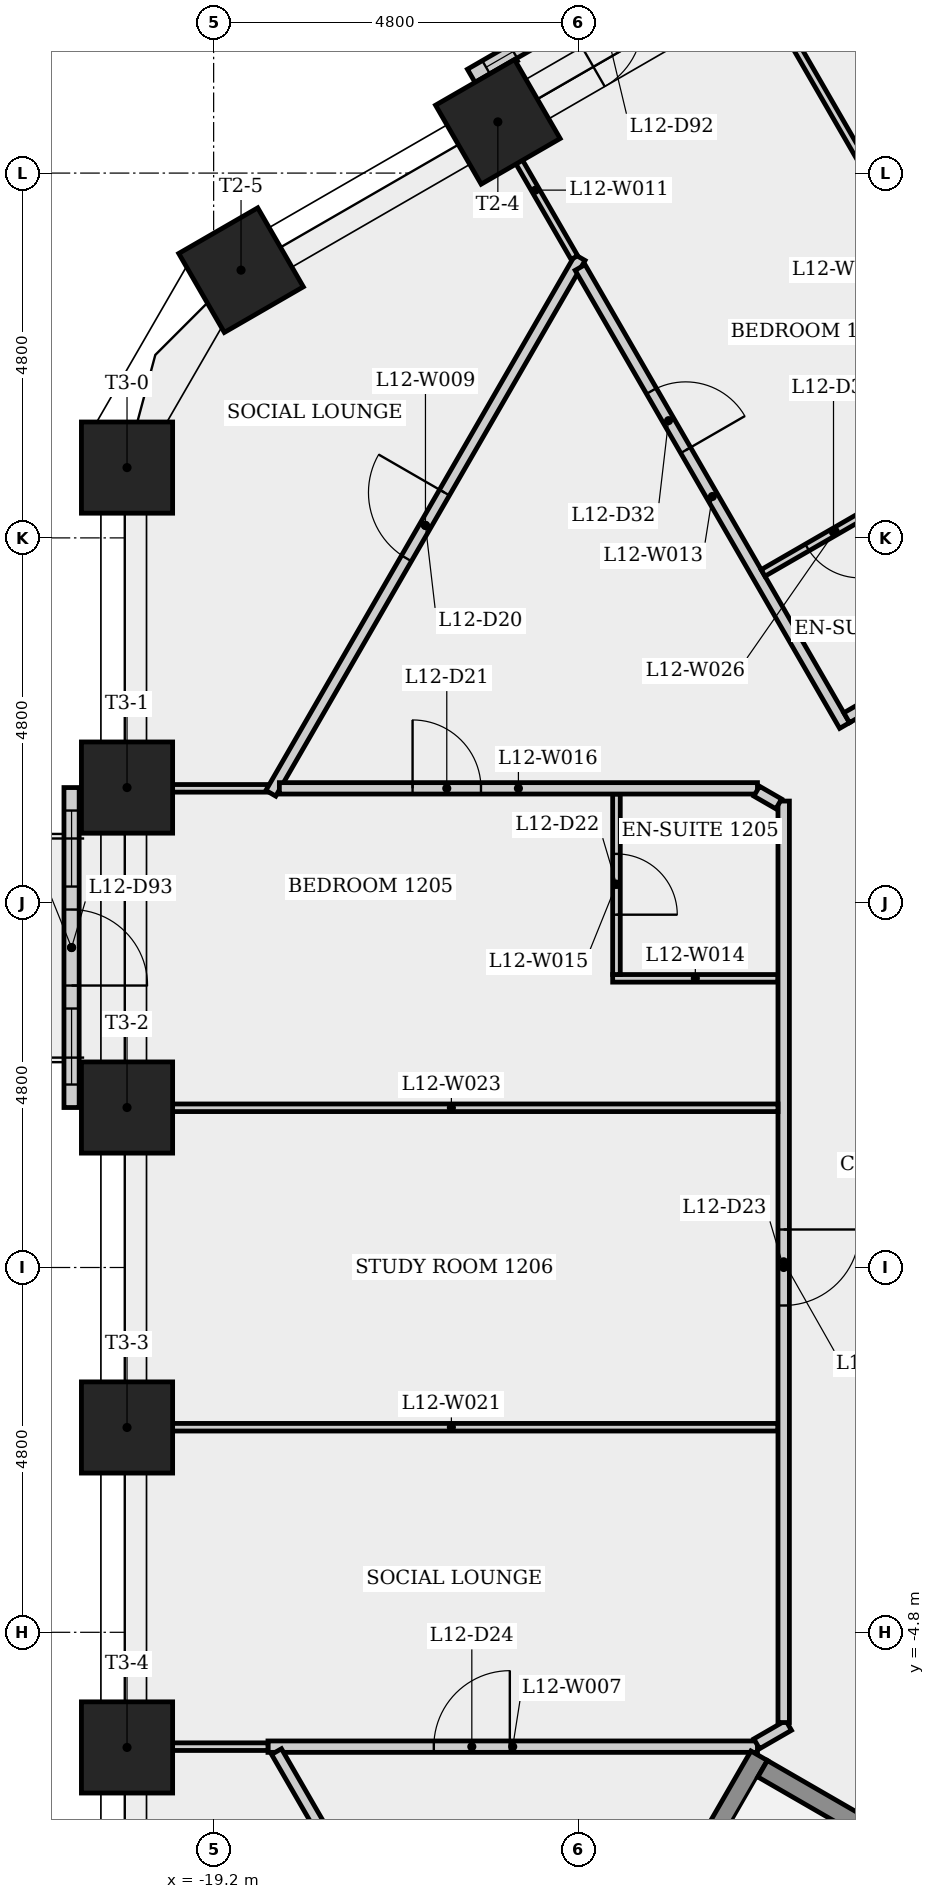
"""IFC4 building model, lengths in metres.
Left out: names, types, materials, properties, quantities, classifications, styles, units other than length and angle.
Written with IfcOpenShell. Run it as: python <this file> out.ifc"""

import sys

from ifc_helpers import new_model, si_unit, direction, frame, frame_2d, origin, origin_2d, place, context, subcontext, project, spatial, rectangle, extrude, element, fill, save


model = new_model("IFC4")
c1 = context("Model", 3, precision=1e-05, world=origin(), true_north=direction((0.0, 1.0)))
c2 = subcontext(c1, "Body", "Model", "MODEL_VIEW")
j1 = project(units=[si_unit("LENGTHUNIT", "METRE"), si_unit("PLANEANGLEUNIT", "RADIAN")], contexts=[c1])
p1 = place(None, origin())
s1 = spatial("IfcSite", under=j1, at=p1, CompositionType="ELEMENT")
p2 = place(p1, origin())
s2 = spatial("IfcBuilding", under=s1, at=p2, CompositionType="ELEMENT")
p3 = place(p2, frame((0.0, 0.0, 49.3)))
s3 = spatial("IfcBuildingStorey", under=s2, at=p3, CompositionType="ELEMENT", Elevation=49.3)
for number, where, z_axis, x_axis in (
    (1, (-15.461, 15.074, 0.0), (0.0, 0.0, 1.0), (-0.5, 0.866, 0.0)),
    (2, (-18.84, 13.123, 0.0), (0.0, 0.0, 1.0), (-0.5, 0.866, 0.0)),
    (3, (-20.34, 10.525, 0.0), (0.0, 0.0, 1.0), (-1.0, 0.0, 0.0)),
    (4, (-20.34, 6.315, 0.0), (0.0, 0.0, 1.0), (-1.0, 0.0, 0.0)),
    (5, (-20.34, 2.105, 0.0), (0.0, 0.0, 1.0), (-1.0, 0.0, 0.0)),
    (6, (-20.34, -2.105, 0.0), (0.0, 0.0, 1.0), (-1.0, 0.0, 0.0)),
    (7, (-20.34, -6.315, 0.0), (0.0, 0.0, 1.0), (-1.0, 0.0, 0.0)),
):
    element("IfcColumn", number, at=place(p3, frame(where, z_axis=z_axis, x_axis=x_axis)), inside=s3, PredefinedType="COLUMN", context=c2, shape_type="SweptSolid", body=[
        extrude(rectangle(XDim=1.2, YDim=1.2, at=origin_2d()), origin(), (0.0, 0.0, 1.0), 3.4),
    ])
p4 = place(p3, frame((-12.432, 17.631, 0.0), z_axis=(0.0, 0.0, 1.0), x_axis=(-0.866028250644, -0.499995069063, 0.0)))
e8 = element("IfcWall", 8, at=p4, inside=s3, PredefinedType="SOLIDWALL", context=c2, shape_type="SweptSolid", body=[
    extrude(rectangle(XDim=3.902, YDim=0.2, at=frame_2d((1.951, 0.0))), origin(), (0.0, 0.0, 1.0), 3.4),
])
p5 = place(p4, frame((1.451, 0.0, 0.0)))
e9 = element("IfcOpeningElement", 9, at=p5, cuts=e8, PredefinedType="OPENING", context=c2, shape_type="SweptSolid", body=[
    extrude(rectangle(XDim=1.0, YDim=2.4, at=frame_2d((0.5, 1.2))), frame((0.0, 0.11, 0.0), z_axis=(0.0, -1.0, 0.0), x_axis=(1.0, 0.0, 0.0)), (0.0, 0.0, 1.0), 0.22),
])
p6 = place(p4, frame((0.226, 0.0, 0.9)))
e10 = element("IfcOpeningElement", 10, at=p6, cuts=e8, PredefinedType="OPENING", context=c2, shape_type="SweptSolid", body=[
    extrude(rectangle(XDim=1.0, YDim=1.5, at=frame_2d((0.5, 0.75))), frame((0.0, 0.11, 0.0), z_axis=(0.0, -1.0, 0.0), x_axis=(1.0, 0.0, 0.0)), (0.0, 0.0, 1.0), 0.22),
])
p7 = place(p4, frame((2.677, 0.0, 0.9)))
e11 = element("IfcOpeningElement", 11, at=p7, cuts=e8, PredefinedType="OPENING", context=c2, shape_type="SweptSolid", body=[
    extrude(rectangle(XDim=1.0, YDim=1.5, at=frame_2d((0.5, 0.75))), frame((0.0, 0.11, 0.0), z_axis=(0.0, -1.0, 0.0), x_axis=(1.0, 0.0, 0.0)), (0.0, 0.0, 1.0), 0.22),
])
p8 = place(p3, frame((-21.069, 6.315, 0.0), z_axis=(0.0, 0.0, 1.0), x_axis=(0.0, -1.0, 0.0)))
e12 = element("IfcWall", 12, at=p8, inside=s3, PredefinedType="SOLIDWALL", context=c2, shape_type="SweptSolid", body=[
    extrude(rectangle(XDim=4.21, YDim=0.2, at=frame_2d((2.105, 0.0))), origin(), (0.0, 0.0, 1.0), 3.4),
])
p9 = place(p8, frame((1.605, 0.0, 0.0)))
e13 = element("IfcOpeningElement", 13, at=p9, cuts=e12, PredefinedType="OPENING", context=c2, shape_type="SweptSolid", body=[
    extrude(rectangle(XDim=1.0, YDim=2.4, at=frame_2d((0.5, 1.2))), frame((0.0, 0.11, 0.0), z_axis=(0.0, -1.0, 0.0), x_axis=(1.0, 0.0, 0.0)), (0.0, 0.0, 1.0), 0.22),
])
p10 = place(p8, frame((0.302, 0.0, 0.9)))
e14 = element("IfcOpeningElement", 14, at=p10, cuts=e12, PredefinedType="OPENING", context=c2, shape_type="SweptSolid", body=[
    extrude(rectangle(XDim=1.0, YDim=1.5, at=frame_2d((0.5, 0.75))), frame((0.0, 0.11, 0.0), z_axis=(0.0, -1.0, 0.0), x_axis=(1.0, 0.0, 0.0)), (0.0, 0.0, 1.0), 0.22),
])
p11 = place(p8, frame((2.907, 0.0, 0.9)))
e15 = element("IfcOpeningElement", 15, at=p11, cuts=e12, PredefinedType="OPENING", context=c2, shape_type="SweptSolid", body=[
    extrude(rectangle(XDim=1.0, YDim=1.5, at=frame_2d((0.5, 0.75))), frame((0.0, 0.11, 0.0), z_axis=(0.0, -1.0, 0.0), x_axis=(1.0, 0.0, 0.0)), (0.0, 0.0, 1.0), 0.22),
])
p12 = place(p3, frame((-18.485, -6.305, 0.0), z_axis=(0.0, 0.0, 1.0), x_axis=(1.0, 0.0, 0.0)))
e16 = element("IfcWall", 16, at=p12, inside=s3, PredefinedType="PARTITIONING", context=c2, shape_type="SweptSolid", body=[
    extrude(rectangle(XDim=6.44, YDim=0.15, at=frame_2d((3.22, 0.0))), origin(), (0.0, 0.0, 1.0), 3.05),
])
p13 = place(p12, frame((2.182, 0.0, 0.0)))
e17 = element("IfcOpeningElement", 17, at=p13, cuts=e16, PredefinedType="OPENING", context=c2, shape_type="SweptSolid", body=[
    extrude(rectangle(XDim=1.0, YDim=2.1, at=frame_2d((0.5, 1.05))), frame((0.0, 0.085, 0.0), z_axis=(0.0, -1.0, 0.0), x_axis=(1.0, 0.0, 0.0)), (0.0, 0.0, 1.0), 0.17),
])
p14 = place(p3, frame((-18.485, 6.305, 0.0), z_axis=(0.0, 0.0, 1.0), x_axis=(-1.0, 0.0, 0.0)))
e18 = element("IfcWall", 18, at=p14, inside=s3, PredefinedType="PARTITIONING", context=c2, shape_type="SweptSolid", body=[
    extrude(rectangle(XDim=1.884, YDim=0.1, at=frame_2d((0.942, 0.0))), origin(), (0.0, 0.0, 1.0), 3.05),
])
p15 = place(p3, frame((-18.448, 6.24, 0.0), z_axis=(0.0, 0.0, 1.0), x_axis=(0.499997699084, 0.866026732215, 0.0)))
e19 = element("IfcWall", 19, at=p15, inside=s3, PredefinedType="PARTITIONING", context=c2, shape_type="SweptSolid", body=[
    extrude(rectangle(XDim=8.139, YDim=0.15, at=frame_2d((4.069, 0.0))), origin(), (0.0, 0.0, 1.0), 3.05),
])
p16 = place(p15, frame((3.569, 0.0, 0.0)))
e20 = element("IfcOpeningElement", 20, at=p16, cuts=e19, PredefinedType="OPENING", context=c2, shape_type="SweptSolid", body=[
    extrude(rectangle(XDim=1.0, YDim=2.1, at=frame_2d((0.5, 1.05))), frame((0.0, 0.085, 0.0), z_axis=(0.0, -1.0, 0.0), x_axis=(1.0, 0.0, 0.0)), (0.0, 0.0, 1.0), 0.17),
])
p17 = place(p3, frame((-18.485, -6.305, 0.0), z_axis=(0.0, 0.0, 1.0), x_axis=(-1.0, 0.0, 0.0)))
e21 = element("IfcWall", 21, at=p17, inside=s3, PredefinedType="PARTITIONING", context=c2, shape_type="SweptSolid", body=[
    extrude(rectangle(XDim=1.884, YDim=0.1, at=frame_2d((0.942, 0.0))), origin(), (0.0, 0.0, 1.0), 3.05),
])
p18 = place(p3, frame((-15.479, 15.063, 0.0), z_axis=(0.0, 0.0, 1.0), x_axis=(0.500045446624, -0.865999163574, 0.0)))
e22 = element("IfcWall", 22, at=p18, inside=s3, PredefinedType="PARTITIONING", context=c2, shape_type="SweptSolid", body=[
    extrude(rectangle(XDim=2.05, YDim=0.1, at=frame_2d((1.025, 0.0))), origin(), (0.0, 0.0, 1.0), 3.05),
])
p19 = place(p3, frame((-15.145, -11.961, 0.0), z_axis=(0.0, 0.0, 1.0), x_axis=(-0.500014864668, 0.866016821494, 0.0)))
e23 = element("IfcWall", 23, at=p19, inside=s3, PredefinedType="PARTITIONING", context=c2, shape_type="SweptSolid", body=[
    extrude(rectangle(XDim=6.456, YDim=0.15, at=frame_2d((3.228, 0.0))), origin(), (0.0, 0.0, 1.0), 3.05),
])
p20 = place(p19, frame((2.766, 0.0, 0.0)))
e24 = element("IfcOpeningElement", 24, at=p20, cuts=e23, PredefinedType="OPENING", context=c2, shape_type="SweptSolid", body=[
    extrude(rectangle(XDim=1.0, YDim=2.1, at=frame_2d((0.5, 1.05))), frame((0.0, 0.085, 0.0), z_axis=(0.0, -1.0, 0.0), x_axis=(1.0, 0.0, 0.0)), (0.0, 0.0, 1.0), 0.17),
])
p21 = place(p3, frame((-14.378, 13.158, 0.0), z_axis=(0.0, 0.0, 1.0), x_axis=(0.499998787219, -0.866026103983, 0.0)))
e25 = element("IfcWall", 25, at=p21, inside=s3, PredefinedType="PARTITIONING", context=c2, shape_type="SweptSolid", body=[
    extrude(rectangle(XDim=6.959, YDim=0.15, at=frame_2d((3.48, 0.0))), origin(), (0.0, 0.0, 1.0), 3.05),
])
p22 = place(p21, frame((1.877, 0.0, 0.0)))
e26 = element("IfcOpeningElement", 26, at=p22, cuts=e25, PredefinedType="OPENING", context=c2, shape_type="SweptSolid", body=[
    extrude(rectangle(XDim=0.9, YDim=2.1, at=frame_2d((0.45, 1.05))), frame((0.0, 0.085, 0.0), z_axis=(0.0, -1.0, 0.0), x_axis=(1.0, 0.0, 0.0)), (0.0, 0.0, 1.0), 0.17),
])
p23 = place(p3, frame((-13.95, 3.805, 0.0), z_axis=(0.0, 0.0, 1.0), x_axis=(1.0, 0.0, 0.0)))
e27 = element("IfcWall", 27, at=p23, inside=s3, PredefinedType="PARTITIONING", context=c2, shape_type="SweptSolid", body=[
    extrude(rectangle(XDim=2.175, YDim=0.1, at=frame_2d((1.087, 0.0))), origin(), (0.0, 0.0, 1.0), 3.05),
])
p24 = place(p3, frame((-13.9, 6.23, 0.0), z_axis=(0.0, 0.0, 1.0), x_axis=(0.0, -1.0, 0.0)))
e28 = element("IfcWall", 28, at=p24, inside=s3, PredefinedType="PARTITIONING", context=c2, shape_type="SweptSolid", body=[
    extrude(rectangle(XDim=2.375, YDim=0.1, at=frame_2d((1.188, 0.0))), origin(), (0.0, 0.0, 1.0), 3.05),
])
p25 = place(p24, frame((0.788, 0.0, 0.0)))
e29 = element("IfcOpeningElement", 29, at=p25, cuts=e28, PredefinedType="OPENING", context=c2, shape_type="SweptSolid", body=[
    extrude(rectangle(XDim=0.8, YDim=2.1, at=frame_2d((0.4, 1.05))), frame((0.0, 0.06, 0.0), z_axis=(0.0, -1.0, 0.0), x_axis=(1.0, 0.0, 0.0)), (0.0, 0.0, 1.0), 0.12),
])
p26 = place(p3, frame((-18.335, 6.305, 0.0), z_axis=(0.0, 0.0, 1.0), x_axis=(1.0, 0.0, 0.0)))
e30 = element("IfcWall", 30, at=p26, inside=s3, PredefinedType="PARTITIONING", context=c2, shape_type="SweptSolid", body=[
    extrude(rectangle(XDim=6.29, YDim=0.15, at=frame_2d((3.145, 0.0))), origin(), (0.0, 0.0, 1.0), 3.05),
])
p27 = place(p26, frame((1.753, 0.0, 0.0)))
e31 = element("IfcOpeningElement", 31, at=p27, cuts=e30, PredefinedType="OPENING", context=c2, shape_type="SweptSolid", body=[
    extrude(rectangle(XDim=0.9, YDim=2.1, at=frame_2d((0.45, 1.05))), frame((0.0, 0.085, 0.0), z_axis=(0.0, -1.0, 0.0), x_axis=(1.0, 0.0, 0.0)), (0.0, 0.0, 1.0), 0.17),
])
p28 = place(p3, frame((-13.648, -9.239, 0.0), z_axis=(0.0, 0.0, 1.0), x_axis=(0.500017246033, 0.866015446554, 0.0)))
e32 = element("IfcWall", 32, at=p28, inside=s3, PredefinedType="SHEAR", context=c2, shape_type="SweptSolid", body=[
    extrude(rectangle(XDim=3.25, YDim=0.25, at=frame_2d((1.625, 0.0))), origin(), (0.0, 0.0, 1.0), 3.05),
])
p29 = place(p3, frame((-12.055, -6.267, 0.0), z_axis=(0.0, 0.0, 1.0), x_axis=(0.86616044843, 0.49976602283, 0.0)))
e33 = element("IfcWall", 33, at=p29, inside=s3, PredefinedType="PARTITIONING", context=c2, shape_type="SweptSolid", body=[
    extrude(rectangle(XDim=0.485, YDim=0.15, at=frame_2d((0.243, 0.0))), origin(), (0.0, 0.0, 1.0), 3.05),
])
p30 = place(p3, frame((-11.977, -6.595, 0.0), z_axis=(0.0, 0.0, 1.0), x_axis=(0.866025499775, -0.499999833739, 0.0)))
e34 = element("IfcWall", 34, at=p30, inside=s3, PredefinedType="SHEAR", context=c2, shape_type="SweptSolid", body=[
    extrude(rectangle(XDim=6.4, YDim=0.25, at=frame_2d((3.2, 0.0))), origin(), (0.0, 0.0, 1.0), 3.05),
])
p31 = place(p30, frame((5.025, 0.0, 0.0)))
e35 = element("IfcOpeningElement", 35, at=p31, cuts=e34, PredefinedType="OPENING", context=c2, shape_type="SweptSolid", body=[
    extrude(rectangle(XDim=1.0, YDim=2.1, at=frame_2d((0.5, 1.05))), frame((0.0, 0.135, 0.0), z_axis=(0.0, -1.0, 0.0), x_axis=(1.0, 0.0, 0.0)), (0.0, 0.0, 1.0), 0.27),
])
p32 = place(p3, frame((-11.775, -2.102, 0.0), z_axis=(0.0, 0.0, 1.0), x_axis=(-1.0, 0.0, 0.0)))
e36 = element("IfcWall", 36, at=p32, inside=s3, PredefinedType="PARTITIONING", context=c2, shape_type="SweptSolid", body=[
    extrude(rectangle(XDim=8.594, YDim=0.1, at=frame_2d((4.297, 0.0))), origin(), (0.0, 0.0, 1.0), 3.05),
])
p33 = place(p3, frame((-11.7, 6.137, 0.0), z_axis=(0.0, 0.0, 1.0), x_axis=(0.0, -1.0, 0.0)))
e37 = element("IfcWall", 37, at=p33, inside=s3, PredefinedType="PARTITIONING", context=c2, shape_type="SweptSolid", body=[
    extrude(rectangle(XDim=12.125, YDim=0.15, at=frame_2d((6.062, 0.0))), origin(), (0.0, 0.0, 1.0), 3.05),
])
p34 = place(p33, frame((5.637, 0.0, 0.0)))
e38 = element("IfcOpeningElement", 38, at=p34, cuts=e37, PredefinedType="OPENING", context=c2, shape_type="SweptSolid", body=[
    extrude(rectangle(XDim=1.0, YDim=2.1, at=frame_2d((0.5, 1.05))), frame((0.0, 0.085, 0.0), z_axis=(0.0, -1.0, 0.0), x_axis=(1.0, 0.0, 0.0)), (0.0, 0.0, 1.0), 0.17),
])
p35 = place(p3, frame((-11.775, 2.102, 0.0), z_axis=(0.0, 0.0, 1.0), x_axis=(-1.0, 0.0, 0.0)))
e39 = element("IfcWall", 39, at=p35, inside=s3, PredefinedType="PARTITIONING", context=c2, shape_type="SweptSolid", body=[
    extrude(rectangle(XDim=8.594, YDim=0.1, at=frame_2d((4.297, 0.0))), origin(), (0.0, 0.0, 1.0), 3.05),
])
p36 = place(p3, frame((-11.765, 6.1, 0.0), z_axis=(0.0, 0.0, 1.0), x_axis=(-0.866173457785, 0.499743475223, 0.0)))
e40 = element("IfcWall", 40, at=p36, inside=s3, PredefinedType="PARTITIONING", context=c2, shape_type="SweptSolid", body=[
    extrude(rectangle(XDim=0.335, YDim=0.15, at=frame_2d((0.167, 0.0))), origin(), (0.0, 0.0, 1.0), 3.05),
])
p37 = place(p3, frame((-10.871, 7.233, 0.0), z_axis=(0.0, 0.0, 1.0), x_axis=(0.866013843593, 0.500020022305, 0.0)))
e41 = element("IfcWall", 41, at=p37, inside=s3, PredefinedType="PARTITIONING", context=c2, shape_type="SweptSolid", body=[
    extrude(rectangle(XDim=11.671, YDim=0.15, at=frame_2d((5.835, 0.0))), origin(), (0.0, 0.0, 1.0), 3.05),
])
p38 = place(p37, frame((4.24, 0.0, 0.0)))
e42 = element("IfcOpeningElement", 42, at=p38, cuts=e41, PredefinedType="OPENING", context=c2, shape_type="SweptSolid", body=[
    extrude(rectangle(XDim=0.9, YDim=2.1, at=frame_2d((0.45, 1.05))), frame((0.0, 0.085, 0.0), z_axis=(0.0, -1.0, 0.0), x_axis=(1.0, 0.0, 0.0)), (0.0, 0.0, 1.0), 0.17),
])
p39 = place(p3, frame((-10.074, 10.234, 0.0), z_axis=(0.0, 0.0, 1.0), x_axis=(-0.866074224396, -0.499915430684, 0.0)))
e43 = element("IfcWall", 43, at=p39, inside=s3, PredefinedType="PARTITIONING", context=c2, shape_type="SweptSolid", body=[
    extrude(rectangle(XDim=2.19, YDim=0.1, at=frame_2d((1.095, 0.0))), origin(), (0.0, 0.0, 1.0), 3.05),
])
p40 = place(p39, frame((0.72, 0.0, 0.0)))
e44 = element("IfcOpeningElement", 44, at=p40, cuts=e43, PredefinedType="OPENING", context=c2, shape_type="SweptSolid", body=[
    extrude(rectangle(XDim=0.8, YDim=2.1, at=frame_2d((0.4, 1.05))), frame((0.0, 0.06, 0.0), z_axis=(0.0, -1.0, 0.0), x_axis=(1.0, 0.0, 0.0)), (0.0, 0.0, 1.0), 0.12),
])
p41 = place(p3, frame((-7.583, 9.219, 0.0), z_axis=(0.0, 0.0, 1.0), x_axis=(-0.499977347544, 0.866038481791, 0.0)))
e45 = element("IfcWall", 45, at=p41, inside=s3, PredefinedType="PARTITIONING", context=c2, shape_type="SweptSolid", body=[
    extrude(rectangle(XDim=9.01, YDim=0.1, at=frame_2d((4.505, 0.0))), origin(), (0.0, 0.0, 1.0), 3.05),
])
p42 = place(p7, origin())
e46 = element("IfcWindow", 46, at=p42, inside=s3, PartitioningType="SINGLE_PANEL", PredefinedType="WINDOW", context=c2, shape_type="SweptSolid", body=[
    extrude(rectangle(XDim=1.0, YDim=1.5, at=frame_2d((0.5, 0.75))), frame((0.0, 0.03, 0.0), z_axis=(0.0, -1.0, 0.0), x_axis=(1.0, 0.0, 0.0)), (0.0, 0.0, 1.0), 0.06),
])
fill(e11, e46)
p43 = place(p9, origin())
e47 = element("IfcDoor", 47, at=p43, inside=s3, OperationType="SINGLE_SWING_RIGHT", PredefinedType="DOOR", context=c2, shape_type="SweptSolid", body=[
    extrude(rectangle(XDim=1.0, YDim=2.4, at=frame_2d((0.5, 1.2))), frame((0.0, 0.025, 0.0), z_axis=(0.0, -1.0, 0.0), x_axis=(1.0, 0.0, 0.0)), (0.0, 0.0, 1.0), 0.05),
])
fill(e13, e47)
p44 = place(p10, origin())
e48 = element("IfcWindow", 48, at=p44, inside=s3, PartitioningType="SINGLE_PANEL", PredefinedType="WINDOW", context=c2, shape_type="SweptSolid", body=[
    extrude(rectangle(XDim=1.0, YDim=1.5, at=frame_2d((0.5, 0.75))), frame((0.0, 0.03, 0.0), z_axis=(0.0, -1.0, 0.0), x_axis=(1.0, 0.0, 0.0)), (0.0, 0.0, 1.0), 0.06),
])
fill(e14, e48)
p45 = place(p11, origin())
e49 = element("IfcWindow", 49, at=p45, inside=s3, PartitioningType="SINGLE_PANEL", PredefinedType="WINDOW", context=c2, shape_type="SweptSolid", body=[
    extrude(rectangle(XDim=1.0, YDim=1.5, at=frame_2d((0.5, 0.75))), frame((0.0, 0.03, 0.0), z_axis=(0.0, -1.0, 0.0), x_axis=(1.0, 0.0, 0.0)), (0.0, 0.0, 1.0), 0.06),
])
fill(e15, e49)
p46 = place(p16, origin())
e50 = element("IfcDoor", 50, at=p46, inside=s3, OperationType="SINGLE_SWING_RIGHT", PredefinedType="DOOR", context=c2, shape_type="SweptSolid", body=[
    extrude(rectangle(XDim=1.0, YDim=2.1, at=frame_2d((0.5, 1.05))), frame((0.0, 0.025, 0.0), z_axis=(0.0, -1.0, 0.0), x_axis=(1.0, 0.0, 0.0)), (0.0, 0.0, 1.0), 0.05),
])
fill(e20, e50)
p47 = place(p27, origin())
e51 = element("IfcDoor", 51, at=p47, inside=s3, OperationType="SINGLE_SWING_LEFT", PredefinedType="DOOR", context=c2, shape_type="SweptSolid", body=[
    extrude(rectangle(XDim=0.9, YDim=2.1, at=frame_2d((0.45, 1.05))), frame((0.0, 0.025, 0.0), z_axis=(0.0, -1.0, 0.0), x_axis=(1.0, 0.0, 0.0)), (0.0, 0.0, 1.0), 0.05),
])
fill(e31, e51)
p48 = place(p25, origin())
e52 = element("IfcDoor", 52, at=p48, inside=s3, OperationType="SINGLE_SWING_RIGHT", PredefinedType="DOOR", context=c2, shape_type="SweptSolid", body=[
    extrude(rectangle(XDim=0.8, YDim=2.1, at=frame_2d((0.4, 1.05))), frame((0.0, 0.025, 0.0), z_axis=(0.0, -1.0, 0.0), x_axis=(1.0, 0.0, 0.0)), (0.0, 0.0, 1.0), 0.05),
])
fill(e29, e52)
p49 = place(p34, origin())
e53 = element("IfcDoor", 53, at=p49, inside=s3, OperationType="SINGLE_SWING_LEFT", PredefinedType="DOOR", context=c2, shape_type="SweptSolid", body=[
    extrude(rectangle(XDim=1.0, YDim=2.1, at=frame_2d((0.5, 1.05))), frame((0.0, 0.025, 0.0), z_axis=(0.0, -1.0, 0.0), x_axis=(1.0, 0.0, 0.0)), (0.0, 0.0, 1.0), 0.05),
])
fill(e38, e53)
p50 = place(p13, origin())
e54 = element("IfcDoor", 54, at=p50, inside=s3, OperationType="SINGLE_SWING_RIGHT", PredefinedType="DOOR", context=c2, shape_type="SweptSolid", body=[
    extrude(rectangle(XDim=1.0, YDim=2.1, at=frame_2d((0.5, 1.05))), frame((0.0, 0.025, 0.0), z_axis=(0.0, -1.0, 0.0), x_axis=(1.0, 0.0, 0.0)), (0.0, 0.0, 1.0), 0.05),
])
fill(e17, e54)
p51 = place(p22, origin())
e55 = element("IfcDoor", 55, at=p51, inside=s3, OperationType="SINGLE_SWING_RIGHT", PredefinedType="DOOR", context=c2, shape_type="SweptSolid", body=[
    extrude(rectangle(XDim=0.9, YDim=2.1, at=frame_2d((0.45, 1.05))), frame((0.0, 0.025, 0.0), z_axis=(0.0, -1.0, 0.0), x_axis=(1.0, 0.0, 0.0)), (0.0, 0.0, 1.0), 0.05),
])
fill(e26, e55)
p52 = place(p40, origin())
e56 = element("IfcDoor", 56, at=p52, inside=s3, OperationType="SINGLE_SWING_LEFT", PredefinedType="DOOR", context=c2, shape_type="SweptSolid", body=[
    extrude(rectangle(XDim=0.8, YDim=2.1, at=frame_2d((0.4, 1.05))), frame((0.0, 0.025, 0.0), z_axis=(0.0, -1.0, 0.0), x_axis=(1.0, 0.0, 0.0)), (0.0, 0.0, 1.0), 0.05),
])
fill(e44, e56)
save(model, sys.argv[1])
